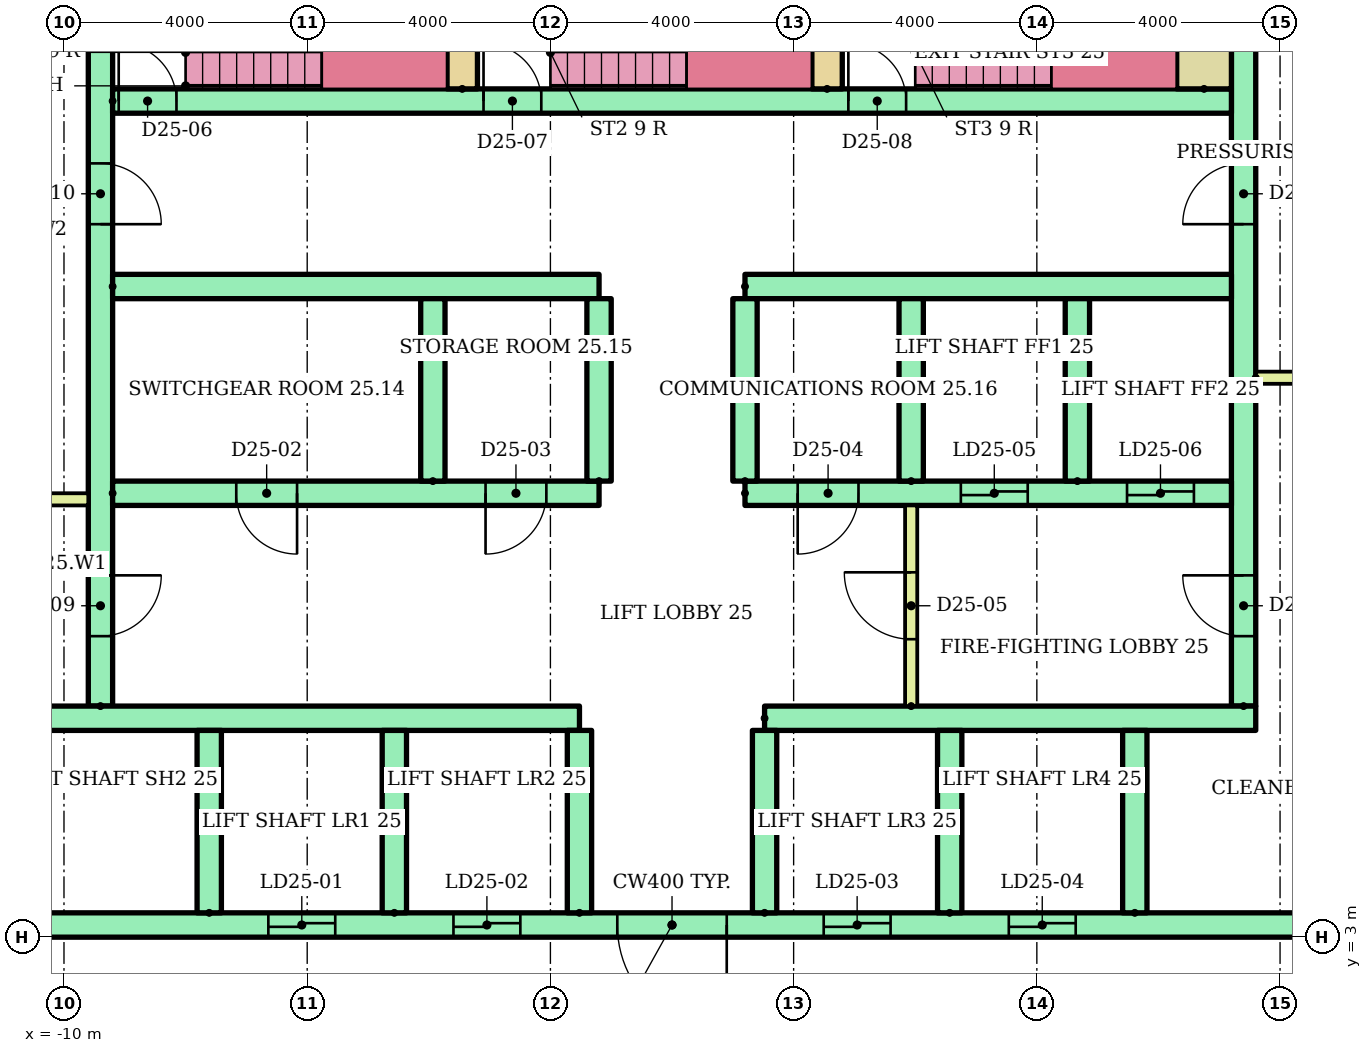
"""IFC4 building model, lengths in metres.
Left out: names, types, materials, properties, quantities, classifications, styles, units other than length and angle.
Written with IfcOpenShell. Run it as: python <this file> out.ifc"""

import sys

from ifc_helpers import new_model, si_unit, direction, frame, frame_2d, origin, place, context, subcontext, project, spatial, rectangle, extrude, element, fill, save


model = new_model("IFC4")
c1 = context("Model", 3, precision=1e-05, world=origin(), true_north=direction((0.0, 1.0)))
c2 = subcontext(c1, "Body", "Model", "MODEL_VIEW")
j1 = project(units=[si_unit("LENGTHUNIT", "METRE"), si_unit("PLANEANGLEUNIT", "RADIAN")], contexts=[c1])
p1 = place(None, origin())
s1 = spatial("IfcSite", under=j1, at=p1, CompositionType="ELEMENT")
p2 = place(p1, origin())
s2 = spatial("IfcBuilding", under=s1, at=p2, CompositionType="ELEMENT")
p3 = place(p2, frame((0.0, 0.0, 96.7)))
s3 = spatial("IfcBuildingStorey", under=s2, at=p3, CompositionType="ELEMENT", Elevation=96.7)
p4 = place(p3, frame((-9.4, 6.8, 0.0), z_axis=(0.0, 0.0, 1.0), x_axis=(0.0, 1.0, 0.0)))
e1 = element("IfcWall", 1, at=p4, inside=s3, PredefinedType="SHEAR", context=c2, shape_type="SweptSolid", body=[
    extrude(rectangle(XDim=12.7, YDim=0.4, at=frame_2d((6.35, 0.0))), origin(), (0.0, 0.0, 1.0), 2.92),
])
p5 = place(p4, frame((1.15, 0.0, 0.0)))
e2 = element("IfcOpeningElement", 2, at=p5, cuts=e1, PredefinedType="OPENING", context=c2, shape_type="SweptSolid", body=[
    extrude(rectangle(XDim=1.0, YDim=2.1, at=frame_2d((0.5, 1.05))), frame((0.0, 0.21, 0.0), z_axis=(0.0, -1.0, 0.0), x_axis=(1.0, 0.0, 0.0)), (0.0, 0.0, 1.0), 0.42),
])
p6 = place(p4, frame((7.925, 0.0, 0.0)))
e3 = element("IfcOpeningElement", 3, at=p6, cuts=e1, PredefinedType="OPENING", context=c2, shape_type="SweptSolid", body=[
    extrude(rectangle(XDim=1.0, YDim=2.1, at=frame_2d((0.5, 1.05))), frame((0.0, 0.21, 0.0), z_axis=(0.0, -1.0, 0.0), x_axis=(1.0, 0.0, 0.0)), (0.0, 0.0, 1.0), 0.42),
])
p7 = place(p3, frame((9.4, 6.8, 0.0), z_axis=(0.0, 0.0, 1.0), x_axis=(0.0, 1.0, 0.0)))
e4 = element("IfcWall", 4, at=p7, inside=s3, PredefinedType="SHEAR", context=c2, shape_type="SweptSolid", body=[
    extrude(rectangle(XDim=12.7, YDim=0.4, at=frame_2d((6.35, 0.0))), origin(), (0.0, 0.0, 1.0), 2.92),
])
p8 = place(p7, frame((1.15, 0.0, 0.0)))
e5 = element("IfcOpeningElement", 5, at=p8, cuts=e4, PredefinedType="OPENING", context=c2, shape_type="SweptSolid", body=[
    extrude(rectangle(XDim=1.0, YDim=2.1, at=frame_2d((0.5, 1.05))), frame((0.0, 0.21, 0.0), z_axis=(0.0, -1.0, 0.0), x_axis=(1.0, 0.0, 0.0)), (0.0, 0.0, 1.0), 0.42),
])
p9 = place(p7, frame((7.925, 0.0, 0.0)))
e6 = element("IfcOpeningElement", 6, at=p9, cuts=e4, PredefinedType="OPENING", context=c2, shape_type="SweptSolid", body=[
    extrude(rectangle(XDim=1.0, YDim=2.1, at=frame_2d((0.5, 1.05))), frame((0.0, 0.21, 0.0), z_axis=(0.0, -1.0, 0.0), x_axis=(1.0, 0.0, 0.0)), (0.0, 0.0, 1.0), 0.42),
])
p10 = place(p3, frame((-13.5, 3.2, 0.0)))
e7 = element("IfcWall", 7, at=p10, inside=s3, PredefinedType="SHEAR", context=c2, shape_type="SweptSolid", body=[
    extrude(rectangle(XDim=27.0, YDim=0.4, at=frame_2d((13.5, 0.0))), origin(), (0.0, 0.0, 1.0), 2.92),
])
p11 = place(p10, frame((6.861, 0.0, 0.0)))
e8 = element("IfcOpeningElement", 8, at=p11, cuts=e7, PredefinedType="OPENING", context=c2, shape_type="SweptSolid", body=[
    extrude(rectangle(XDim=1.1, YDim=2.1, at=frame_2d((0.55, 1.05))), frame((0.0, 0.21, 0.0), z_axis=(0.0, -1.0, 0.0), x_axis=(1.0, 0.0, 0.0)), (0.0, 0.0, 1.0), 0.42),
])
p12 = place(p10, frame((9.906, 0.0, 0.0)))
e9 = element("IfcOpeningElement", 9, at=p12, cuts=e7, PredefinedType="OPENING", context=c2, shape_type="SweptSolid", body=[
    extrude(rectangle(XDim=1.1, YDim=2.1, at=frame_2d((0.55, 1.05))), frame((0.0, 0.21, 0.0), z_axis=(0.0, -1.0, 0.0), x_axis=(1.0, 0.0, 0.0)), (0.0, 0.0, 1.0), 0.42),
])
p13 = place(p10, frame((15.994, 0.0, 0.0)))
e10 = element("IfcOpeningElement", 10, at=p13, cuts=e7, PredefinedType="OPENING", context=c2, shape_type="SweptSolid", body=[
    extrude(rectangle(XDim=1.1, YDim=2.1, at=frame_2d((0.55, 1.05))), frame((0.0, 0.21, 0.0), z_axis=(0.0, -1.0, 0.0), x_axis=(1.0, 0.0, 0.0)), (0.0, 0.0, 1.0), 0.42),
])
p14 = place(p10, frame((19.039, 0.0, 0.0)))
e11 = element("IfcOpeningElement", 11, at=p14, cuts=e7, PredefinedType="OPENING", context=c2, shape_type="SweptSolid", body=[
    extrude(rectangle(XDim=1.1, YDim=2.1, at=frame_2d((0.55, 1.05))), frame((0.0, 0.21, 0.0), z_axis=(0.0, -1.0, 0.0), x_axis=(1.0, 0.0, 0.0)), (0.0, 0.0, 1.0), 0.42),
])
p15 = place(p10, frame((12.6, 0.0, 0.0)))
e12 = element("IfcOpeningElement", 12, at=p15, cuts=e7, PredefinedType="OPENING", context=c2, shape_type="SweptSolid", body=[
    extrude(rectangle(XDim=1.8, YDim=2.1, at=frame_2d((0.9, 1.05))), frame((0.0, 0.21, 0.0), z_axis=(0.0, -1.0, 0.0), x_axis=(1.0, 0.0, 0.0)), (0.0, 0.0, 1.0), 0.42),
])
p16 = place(p3, frame((-13.5, 6.6, 0.0)))
e13 = element("IfcWall", 13, at=p16, inside=s3, PredefinedType="SHEAR", context=c2, shape_type="SweptSolid", body=[
    extrude(rectangle(XDim=11.978, YDim=0.4, at=frame_2d((5.989, 0.0))), origin(), (0.0, 0.0, 1.0), 2.92),
])
p17 = place(p3, frame((1.522, 6.6, 0.0)))
e14 = element("IfcWall", 14, at=p17, inside=s3, PredefinedType="SHEAR", context=c2, shape_type="SweptSolid", body=[
    extrude(rectangle(XDim=8.078, YDim=0.4, at=frame_2d((4.039, 0.0))), origin(), (0.0, 0.0, 1.0), 2.92),
])
for number, where, z_axis, x_axis in (
    (15, (-7.611, 3.4, 0.0), (0.0, 0.0, 1.0), (0.0, 1.0, 0.0)),
    (16, (-4.567, 3.4, 0.0), (0.0, 0.0, 1.0), (0.0, 1.0, 0.0)),
    (17, (-1.522, 3.4, 0.0), (0.0, 0.0, 1.0), (0.0, 1.0, 0.0)),
    (18, (1.522, 3.4, 0.0), (0.0, 0.0, 1.0), (0.0, 1.0, 0.0)),
    (19, (4.567, 3.4, 0.0), (0.0, 0.0, 1.0), (0.0, 1.0, 0.0)),
    (20, (7.611, 3.4, 0.0), (0.0, 0.0, 1.0), (0.0, 1.0, 0.0)),
):
    element("IfcWall", number, at=place(p3, frame(where, z_axis=z_axis, x_axis=x_axis)), inside=s3, PredefinedType="SHEAR", context=c2, shape_type="SweptSolid", body=[
        extrude(rectangle(XDim=3.0, YDim=0.4, at=frame_2d((1.5, 0.0))), origin(), (0.0, 0.0, 1.0), 2.92),
    ])
p18 = place(p3, frame((-9.2, 10.3, 0.0)))
e21 = element("IfcWall", 21, at=p18, inside=s3, PredefinedType="SHEAR", context=c2, shape_type="SweptSolid", body=[
    extrude(rectangle(XDim=8.0, YDim=0.4, at=frame_2d((4.0, 0.0))), origin(), (0.0, 0.0, 1.0), 2.92),
])
p19 = place(p18, frame((2.033, 0.0, 0.0)))
e22 = element("IfcOpeningElement", 22, at=p19, cuts=e21, PredefinedType="OPENING", context=c2, shape_type="SweptSolid", body=[
    extrude(rectangle(XDim=1.0, YDim=2.1, at=frame_2d((0.5, 1.05))), frame((0.0, 0.21, 0.0), z_axis=(0.0, -1.0, 0.0), x_axis=(1.0, 0.0, 0.0)), (0.0, 0.0, 1.0), 0.42),
])
p20 = place(p18, frame((6.133, 0.0, 0.0)))
e23 = element("IfcOpeningElement", 23, at=p20, cuts=e21, PredefinedType="OPENING", context=c2, shape_type="SweptSolid", body=[
    extrude(rectangle(XDim=1.0, YDim=2.1, at=frame_2d((0.5, 1.05))), frame((0.0, 0.21, 0.0), z_axis=(0.0, -1.0, 0.0), x_axis=(1.0, 0.0, 0.0)), (0.0, 0.0, 1.0), 0.42),
])
p21 = place(p3, frame((-9.2, 13.7, 0.0)))
e24 = element("IfcWall", 24, at=p21, inside=s3, PredefinedType="SHEAR", context=c2, shape_type="SweptSolid", body=[
    extrude(rectangle(XDim=8.0, YDim=0.4, at=frame_2d((4.0, 0.0))), origin(), (0.0, 0.0, 1.0), 2.92),
])
p22 = place(p3, frame((1.2, 10.3, 0.0)))
e25 = element("IfcWall", 25, at=p22, inside=s3, PredefinedType="SHEAR", context=c2, shape_type="SweptSolid", body=[
    extrude(rectangle(XDim=8.0, YDim=0.4, at=frame_2d((4.0, 0.0))), origin(), (0.0, 0.0, 1.0), 2.92),
])
p23 = place(p22, frame((3.55, 0.0, 0.0)))
e26 = element("IfcOpeningElement", 26, at=p23, cuts=e25, PredefinedType="OPENING", context=c2, shape_type="SweptSolid", body=[
    extrude(rectangle(XDim=1.1, YDim=2.1, at=frame_2d((0.55, 1.05))), frame((0.0, 0.21, 0.0), z_axis=(0.0, -1.0, 0.0), x_axis=(1.0, 0.0, 0.0)), (0.0, 0.0, 1.0), 0.42),
])
p24 = place(p22, frame((6.283, 0.0, 0.0)))
e27 = element("IfcOpeningElement", 27, at=p24, cuts=e25, PredefinedType="OPENING", context=c2, shape_type="SweptSolid", body=[
    extrude(rectangle(XDim=1.1, YDim=2.1, at=frame_2d((0.55, 1.05))), frame((0.0, 0.21, 0.0), z_axis=(0.0, -1.0, 0.0), x_axis=(1.0, 0.0, 0.0)), (0.0, 0.0, 1.0), 0.42),
])
p25 = place(p22, frame((0.867, 0.0, 0.0)))
e28 = element("IfcOpeningElement", 28, at=p25, cuts=e25, PredefinedType="OPENING", context=c2, shape_type="SweptSolid", body=[
    extrude(rectangle(XDim=1.0, YDim=2.1, at=frame_2d((0.5, 1.05))), frame((0.0, 0.21, 0.0), z_axis=(0.0, -1.0, 0.0), x_axis=(1.0, 0.0, 0.0)), (0.0, 0.0, 1.0), 0.42),
])
p26 = place(p3, frame((1.2, 13.7, 0.0)))
e29 = element("IfcWall", 29, at=p26, inside=s3, PredefinedType="SHEAR", context=c2, shape_type="SweptSolid", body=[
    extrude(rectangle(XDim=8.0, YDim=0.4, at=frame_2d((4.0, 0.0))), origin(), (0.0, 0.0, 1.0), 2.92),
])
for number, where, z_axis, x_axis in (
    (30, (-3.933, 10.5, 0.0), (0.0, 0.0, 1.0), (0.0, 1.0, 0.0)),
    (31, (-1.2, 10.5, 0.0), (0.0, 0.0, 1.0), (0.0, 1.0, 0.0)),
    (32, (1.2, 10.5, 0.0), (0.0, 0.0, 1.0), (0.0, 1.0, 0.0)),
    (33, (3.933, 10.5, 0.0), (0.0, 0.0, 1.0), (0.0, 1.0, 0.0)),
    (34, (6.667, 10.5, 0.0), (0.0, 0.0, 1.0), (0.0, 1.0, 0.0)),
):
    element("IfcWall", number, at=place(p3, frame(where, z_axis=z_axis, x_axis=x_axis)), inside=s3, PredefinedType="SHEAR", context=c2, shape_type="SweptSolid", body=[
        extrude(rectangle(XDim=3.0, YDim=0.4, at=frame_2d((1.5, 0.0))), origin(), (0.0, 0.0, 1.0), 2.92),
    ])
p27 = place(p3, frame((3.933, 6.8, 0.0), z_axis=(0.0, 0.0, 1.0), x_axis=(0.0, 1.0, 0.0)))
e35 = element("IfcWall", 35, at=p27, inside=s3, PredefinedType="PARTITIONING", context=c2, shape_type="SweptSolid", body=[
    extrude(rectangle(XDim=3.3, YDim=0.2, at=frame_2d((1.65, 0.0))), origin(), (0.0, 0.0, 1.0), 2.92),
])
p28 = place(p27, frame((1.1, 0.0, 0.0)))
e36 = element("IfcOpeningElement", 36, at=p28, cuts=e35, PredefinedType="OPENING", context=c2, shape_type="SweptSolid", body=[
    extrude(rectangle(XDim=1.1, YDim=2.1, at=frame_2d((0.55, 1.05))), frame((0.0, 0.11, 0.0), z_axis=(0.0, -1.0, 0.0), x_axis=(1.0, 0.0, 0.0)), (0.0, 0.0, 1.0), 0.22),
])
p29 = place(p3, frame((-9.2, 16.75, 0.0)))
e37 = element("IfcWall", 37, at=p29, inside=s3, PredefinedType="SHEAR", context=c2, shape_type="SweptSolid", body=[
    extrude(rectangle(XDim=18.4, YDim=0.4, at=frame_2d((9.2, 0.0))), origin(), (0.0, 0.0, 1.0), 2.92),
])
p30 = place(p29, frame((0.1, 0.0, 0.0)))
e38 = element("IfcOpeningElement", 38, at=p30, cuts=e37, PredefinedType="OPENING", context=c2, shape_type="SweptSolid", body=[
    extrude(rectangle(XDim=0.95, YDim=2.1, at=frame_2d((0.475, 1.05))), frame((0.0, 0.21, 0.0), z_axis=(0.0, -1.0, 0.0), x_axis=(1.0, 0.0, 0.0)), (0.0, 0.0, 1.0), 0.42),
])
p31 = place(p29, frame((6.1, 0.0, 0.0)))
e39 = element("IfcOpeningElement", 39, at=p31, cuts=e37, PredefinedType="OPENING", context=c2, shape_type="SweptSolid", body=[
    extrude(rectangle(XDim=0.95, YDim=2.1, at=frame_2d((0.475, 1.05))), frame((0.0, 0.21, 0.0), z_axis=(0.0, -1.0, 0.0), x_axis=(1.0, 0.0, 0.0)), (0.0, 0.0, 1.0), 0.42),
])
p32 = place(p29, frame((12.1, 0.0, 0.0)))
e40 = element("IfcOpeningElement", 40, at=p32, cuts=e37, PredefinedType="OPENING", context=c2, shape_type="SweptSolid", body=[
    extrude(rectangle(XDim=0.95, YDim=2.1, at=frame_2d((0.475, 1.05))), frame((0.0, 0.21, 0.0), z_axis=(0.0, -1.0, 0.0), x_axis=(1.0, 0.0, 0.0)), (0.0, 0.0, 1.0), 0.42),
])
for number, where, z_axis, x_axis in (
    (41, (-3.45, 16.95, 0.0), (0.0, 0.0, 1.0), (0.0, 1.0, 0.0)),
    (42, (2.55, 16.95, 0.0), (0.0, 0.0, 1.0), (0.0, 1.0, 0.0)),
):
    element("IfcWall", number, at=place(p3, frame(where, z_axis=z_axis, x_axis=x_axis)), inside=s3, PredefinedType="SHEAR", context=c2, shape_type="SweptSolid", body=[
        extrude(rectangle(XDim=2.55, YDim=0.5, at=frame_2d((1.275, 0.0))), origin(), (0.0, 0.0, 1.0), 2.92),
    ])
p33 = place(p3, frame((8.75, 16.95, 0.0), z_axis=(0.0, 0.0, 1.0), x_axis=(0.0, 1.0, 0.0)))
e43 = element("IfcWall", 43, at=p33, inside=s3, PredefinedType="SHEAR", context=c2, shape_type="SweptSolid", body=[
    extrude(rectangle(XDim=2.55, YDim=0.9, at=frame_2d((1.275, 0.0))), origin(), (0.0, 0.0, 1.0), 2.92),
])
for number, where in (
    (44, (-13.5, 10.2, 0.0)),
    (45, (9.6, 12.2, 0.0)),
):
    element("IfcWall", number, at=place(p3, frame(where)), inside=s3, PredefinedType="PARTITIONING", context=c2, shape_type="SweptSolid", body=[
        extrude(rectangle(XDim=3.9, YDim=0.2, at=frame_2d((1.95, 0.0))), origin(), (0.0, 0.0, 1.0), 2.92),
    ])
p34 = place(p11, origin())
e46 = element("IfcDoor", 46, at=p34, inside=s3, OperationType="SLIDING_TO_LEFT", PredefinedType="DOOR", context=c2, shape_type="SweptSolid", body=[
    extrude(rectangle(XDim=1.1, YDim=2.1, at=frame_2d((0.55, 1.05))), frame((0.0, 0.025, 0.0), z_axis=(0.0, -1.0, 0.0), x_axis=(1.0, 0.0, 0.0)), (0.0, 0.0, 1.0), 0.05),
])
fill(e8, e46)
p35 = place(p12, origin())
e47 = element("IfcDoor", 47, at=p35, inside=s3, OperationType="SLIDING_TO_LEFT", PredefinedType="DOOR", context=c2, shape_type="SweptSolid", body=[
    extrude(rectangle(XDim=1.1, YDim=2.1, at=frame_2d((0.55, 1.05))), frame((0.0, 0.025, 0.0), z_axis=(0.0, -1.0, 0.0), x_axis=(1.0, 0.0, 0.0)), (0.0, 0.0, 1.0), 0.05),
])
fill(e9, e47)
p36 = place(p13, origin())
e48 = element("IfcDoor", 48, at=p36, inside=s3, OperationType="SLIDING_TO_LEFT", PredefinedType="DOOR", context=c2, shape_type="SweptSolid", body=[
    extrude(rectangle(XDim=1.1, YDim=2.1, at=frame_2d((0.55, 1.05))), frame((0.0, 0.025, 0.0), z_axis=(0.0, -1.0, 0.0), x_axis=(1.0, 0.0, 0.0)), (0.0, 0.0, 1.0), 0.05),
])
fill(e10, e48)
p37 = place(p14, origin())
e49 = element("IfcDoor", 49, at=p37, inside=s3, OperationType="SLIDING_TO_LEFT", PredefinedType="DOOR", context=c2, shape_type="SweptSolid", body=[
    extrude(rectangle(XDim=1.1, YDim=2.1, at=frame_2d((0.55, 1.05))), frame((0.0, 0.025, 0.0), z_axis=(0.0, -1.0, 0.0), x_axis=(1.0, 0.0, 0.0)), (0.0, 0.0, 1.0), 0.05),
])
fill(e11, e49)
p38 = place(p15, frame((1.8, 0.0, 0.0), z_axis=(0.0, 0.0, 1.0), x_axis=(-1.0, 0.0, 0.0)))
e50 = element("IfcDoor", 50, at=p38, inside=s3, OperationType="DOUBLE_DOOR_SINGLE_SWING", PredefinedType="DOOR", context=c2, shape_type="SweptSolid", body=[
    extrude(rectangle(XDim=1.8, YDim=2.1, at=frame_2d((0.9, 1.05))), frame((0.0, 0.025, 0.0), z_axis=(0.0, -1.0, 0.0), x_axis=(1.0, 0.0, 0.0)), (0.0, 0.0, 1.0), 0.05),
])
fill(e12, e50)
p39 = place(p23, origin())
e51 = element("IfcDoor", 51, at=p39, inside=s3, OperationType="SLIDING_TO_LEFT", PredefinedType="DOOR", context=c2, shape_type="SweptSolid", body=[
    extrude(rectangle(XDim=1.1, YDim=2.1, at=frame_2d((0.55, 1.05))), frame((0.0, 0.025, 0.0), z_axis=(0.0, -1.0, 0.0), x_axis=(1.0, 0.0, 0.0)), (0.0, 0.0, 1.0), 0.05),
])
fill(e26, e51)
p40 = place(p24, origin())
e52 = element("IfcDoor", 52, at=p40, inside=s3, OperationType="SLIDING_TO_LEFT", PredefinedType="DOOR", context=c2, shape_type="SweptSolid", body=[
    extrude(rectangle(XDim=1.1, YDim=2.1, at=frame_2d((0.55, 1.05))), frame((0.0, 0.025, 0.0), z_axis=(0.0, -1.0, 0.0), x_axis=(1.0, 0.0, 0.0)), (0.0, 0.0, 1.0), 0.05),
])
fill(e27, e52)
p41 = place(p19, frame((1.0, 0.0, 0.0), z_axis=(0.0, 0.0, 1.0), x_axis=(-1.0, 0.0, 0.0)))
e53 = element("IfcDoor", 53, at=p41, inside=s3, OperationType="SINGLE_SWING_RIGHT", PredefinedType="DOOR", context=c2, shape_type="SweptSolid", body=[
    extrude(rectangle(XDim=1.0, YDim=2.1, at=frame_2d((0.5, 1.05))), frame((0.0, 0.025, 0.0), z_axis=(0.0, -1.0, 0.0), x_axis=(1.0, 0.0, 0.0)), (0.0, 0.0, 1.0), 0.05),
])
fill(e22, e53)
p42 = place(p20, frame((1.0, 0.0, 0.0), z_axis=(0.0, 0.0, 1.0), x_axis=(-1.0, 0.0, 0.0)))
e54 = element("IfcDoor", 54, at=p42, inside=s3, OperationType="SINGLE_SWING_LEFT", PredefinedType="DOOR", context=c2, shape_type="SweptSolid", body=[
    extrude(rectangle(XDim=1.0, YDim=2.1, at=frame_2d((0.5, 1.05))), frame((0.0, 0.025, 0.0), z_axis=(0.0, -1.0, 0.0), x_axis=(1.0, 0.0, 0.0)), (0.0, 0.0, 1.0), 0.05),
])
fill(e23, e54)
p43 = place(p25, frame((1.0, 0.0, 0.0), z_axis=(0.0, 0.0, 1.0), x_axis=(-1.0, 0.0, 0.0)))
e55 = element("IfcDoor", 55, at=p43, inside=s3, OperationType="SINGLE_SWING_LEFT", PredefinedType="DOOR", context=c2, shape_type="SweptSolid", body=[
    extrude(rectangle(XDim=1.0, YDim=2.1, at=frame_2d((0.5, 1.05))), frame((0.0, 0.025, 0.0), z_axis=(0.0, -1.0, 0.0), x_axis=(1.0, 0.0, 0.0)), (0.0, 0.0, 1.0), 0.05),
])
fill(e28, e55)
p44 = place(p28, origin())
e56 = element("IfcDoor", 56, at=p44, inside=s3, OperationType="SINGLE_SWING_RIGHT", PredefinedType="DOOR", context=c2, shape_type="SweptSolid", body=[
    extrude(rectangle(XDim=1.1, YDim=2.1, at=frame_2d((0.55, 1.05))), frame((0.0, 0.025, 0.0), z_axis=(0.0, -1.0, 0.0), x_axis=(1.0, 0.0, 0.0)), (0.0, 0.0, 1.0), 0.05),
])
fill(e36, e56)
p45 = place(p30, origin())
e57 = element("IfcDoor", 57, at=p45, inside=s3, OperationType="SINGLE_SWING_LEFT", PredefinedType="DOOR", context=c2, shape_type="SweptSolid", body=[
    extrude(rectangle(XDim=0.95, YDim=2.1, at=frame_2d((0.475, 1.05))), frame((0.0, 0.025, 0.0), z_axis=(0.0, -1.0, 0.0), x_axis=(1.0, 0.0, 0.0)), (0.0, 0.0, 1.0), 0.05),
])
fill(e38, e57)
p46 = place(p31, origin())
e58 = element("IfcDoor", 58, at=p46, inside=s3, OperationType="SINGLE_SWING_LEFT", PredefinedType="DOOR", context=c2, shape_type="SweptSolid", body=[
    extrude(rectangle(XDim=0.95, YDim=2.1, at=frame_2d((0.475, 1.05))), frame((0.0, 0.025, 0.0), z_axis=(0.0, -1.0, 0.0), x_axis=(1.0, 0.0, 0.0)), (0.0, 0.0, 1.0), 0.05),
])
fill(e39, e58)
p47 = place(p32, origin())
e59 = element("IfcDoor", 59, at=p47, inside=s3, OperationType="SINGLE_SWING_LEFT", PredefinedType="DOOR", context=c2, shape_type="SweptSolid", body=[
    extrude(rectangle(XDim=0.95, YDim=2.1, at=frame_2d((0.475, 1.05))), frame((0.0, 0.025, 0.0), z_axis=(0.0, -1.0, 0.0), x_axis=(1.0, 0.0, 0.0)), (0.0, 0.0, 1.0), 0.05),
])
fill(e40, e59)
p48 = place(p5, frame((1.0, 0.0, 0.0), z_axis=(0.0, 0.0, 1.0), x_axis=(-1.0, 0.0, 0.0)))
e60 = element("IfcDoor", 60, at=p48, inside=s3, OperationType="SINGLE_SWING_RIGHT", PredefinedType="DOOR", context=c2, shape_type="SweptSolid", body=[
    extrude(rectangle(XDim=1.0, YDim=2.1, at=frame_2d((0.5, 1.05))), frame((0.0, 0.025, 0.0), z_axis=(0.0, -1.0, 0.0), x_axis=(1.0, 0.0, 0.0)), (0.0, 0.0, 1.0), 0.05),
])
fill(e2, e60)
p49 = place(p6, frame((1.0, 0.0, 0.0), z_axis=(0.0, 0.0, 1.0), x_axis=(-1.0, 0.0, 0.0)))
e61 = element("IfcDoor", 61, at=p49, inside=s3, OperationType="SINGLE_SWING_LEFT", PredefinedType="DOOR", context=c2, shape_type="SweptSolid", body=[
    extrude(rectangle(XDim=1.0, YDim=2.1, at=frame_2d((0.5, 1.05))), frame((0.0, 0.025, 0.0), z_axis=(0.0, -1.0, 0.0), x_axis=(1.0, 0.0, 0.0)), (0.0, 0.0, 1.0), 0.05),
])
fill(e3, e61)
p50 = place(p8, origin())
e62 = element("IfcDoor", 62, at=p50, inside=s3, OperationType="SINGLE_SWING_RIGHT", PredefinedType="DOOR", context=c2, shape_type="SweptSolid", body=[
    extrude(rectangle(XDim=1.0, YDim=2.1, at=frame_2d((0.5, 1.05))), frame((0.0, 0.025, 0.0), z_axis=(0.0, -1.0, 0.0), x_axis=(1.0, 0.0, 0.0)), (0.0, 0.0, 1.0), 0.05),
])
fill(e5, e62)
p51 = place(p9, origin())
e63 = element("IfcDoor", 63, at=p51, inside=s3, OperationType="SINGLE_SWING_LEFT", PredefinedType="DOOR", context=c2, shape_type="SweptSolid", body=[
    extrude(rectangle(XDim=1.0, YDim=2.1, at=frame_2d((0.5, 1.05))), frame((0.0, 0.025, 0.0), z_axis=(0.0, -1.0, 0.0), x_axis=(1.0, 0.0, 0.0)), (0.0, 0.0, 1.0), 0.05),
])
fill(e6, e63)
save(model, sys.argv[1])
